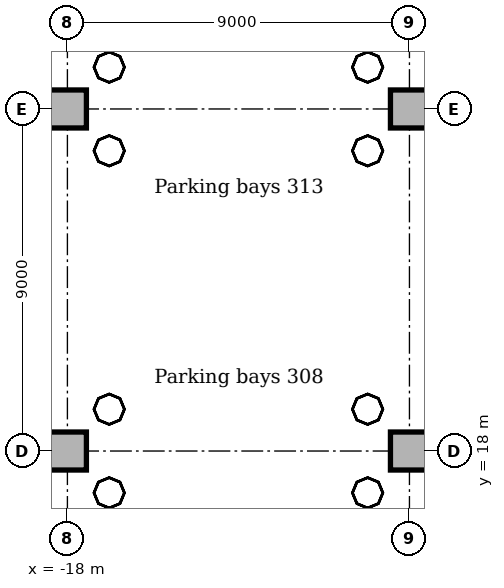
"""IFC4 building model, lengths in metres.
Left out: names, types, materials, properties, quantities, classifications, styles, units other than length and angle.
Written with IfcOpenShell. Run it as: python <this file> out.ifc"""

import sys

from ifc_helpers import new_model, si_unit, direction, frame, origin, origin_2d, place, context, subcontext, project, spatial, rectangle, extrude, element, save


model = new_model("IFC4")
c1 = context("Model", 3, precision=1e-05, world=origin(), true_north=direction((0.0, 1.0)))
c2 = subcontext(c1, "Body", "Model", "MODEL_VIEW")
j1 = project(units=[si_unit("LENGTHUNIT", "METRE"), si_unit("PLANEANGLEUNIT", "RADIAN")], contexts=[c1])
p1 = place(None, origin())
s1 = spatial("IfcSite", under=j1, at=p1, CompositionType="ELEMENT")
p2 = place(p1, origin())
s2 = spatial("IfcBuilding", under=s1, at=p2, CompositionType="ELEMENT")
p3 = place(p2, frame((0.0, 0.0, -14.0)))
s3 = spatial("IfcBuildingStorey", under=s2, at=p3, CompositionType="ELEMENT", Elevation=-14.0)
for number, where, z_axis, x_axis in (
    (1, (-18.0, 18.0, 0.0), (0.0, 0.0, 1.0), (1.0, 0.0, 0.0)),
    (2, (-18.0, 27.0, 0.0), (0.0, 0.0, 1.0), (1.0, 0.0, 0.0)),
    (3, (-9.0, 18.0, 0.0), (0.0, 0.0, 1.0), (1.0, 0.0, 0.0)),
    (4, (-9.0, 27.0, 0.0), (0.0, 0.0, 1.0), (1.0, 0.0, 0.0)),
):
    element("IfcColumn", number, at=place(p3, frame(where, z_axis=z_axis, x_axis=x_axis)), inside=s3, PredefinedType="COLUMN", context=c2, shape_type="SweptSolid", body=[
        extrude(rectangle(XDim=1.0, YDim=1.0, at=origin_2d()), origin(), (0.0, 0.0, 1.0), 4.15),
    ])
save(model, sys.argv[1])
